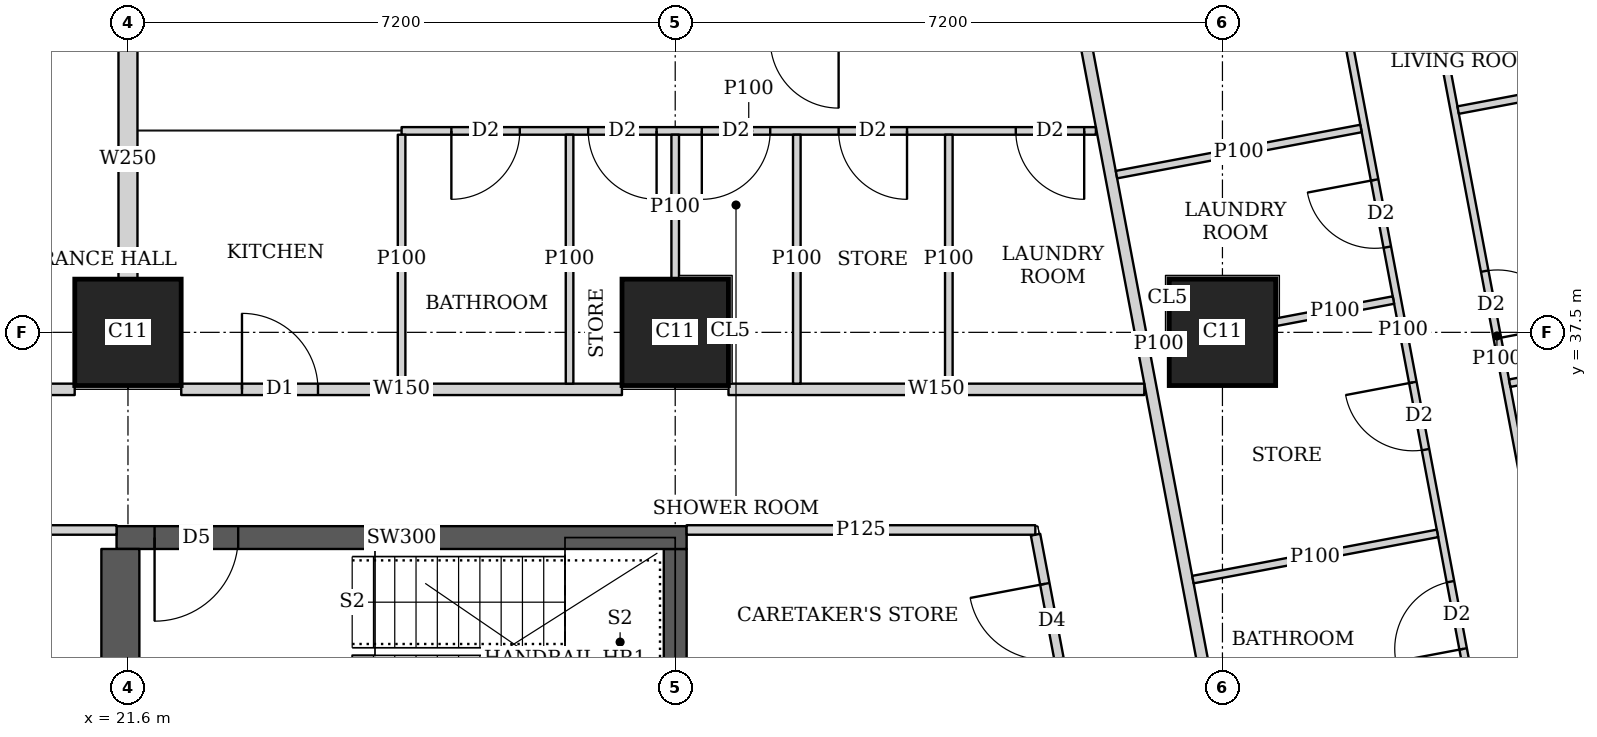
"""IFC4 building model, lengths in metres.
Left out: names, types, materials, properties, quantities, classifications, styles, units other than length and angle.
Written with IfcOpenShell. Run it as: python <this file> out.ifc"""

import sys

from ifc_helpers import new_model, si_unit, direction, frame, frame_2d, origin, origin_2d, place, context, subcontext, project, spatial, rectangle, extrude, element, fill, save


model = new_model("IFC4")
c1 = context("Model", 3, precision=1e-05, world=origin(), true_north=direction((0.0, 1.0)))
c2 = subcontext(c1, "Body", "Model", "MODEL_VIEW")
j1 = project(units=[si_unit("LENGTHUNIT", "METRE"), si_unit("PLANEANGLEUNIT", "RADIAN")], contexts=[c1])
p1 = place(None, origin())
s1 = spatial("IfcSite", under=j1, at=p1, CompositionType="ELEMENT")
p2 = place(p1, origin())
s2 = spatial("IfcBuilding", under=s1, at=p2, CompositionType="ELEMENT")
p3 = place(p2, frame((0.0, 0.0, 234.95)))
s3 = spatial("IfcBuildingStorey", under=s2, at=p3, CompositionType="ELEMENT", Elevation=234.95)
for number, where, z_axis, x_axis in (
    (1, (21.6, 37.5, 0.0), (0.0, 0.0, 1.0), (1.0, 0.0, 0.0)),
    (2, (28.8, 37.5, 0.0), (0.0, 0.0, 1.0), (1.0, 0.0, 0.0)),
    (3, (36.0, 37.5, 0.0), (0.0, 0.0, 1.0), (1.0, 0.0, 0.0)),
):
    element("IfcColumn", number, at=place(p3, frame(where, z_axis=z_axis, x_axis=x_axis)), inside=s3, PredefinedType="COLUMN", context=c2, shape_type="SweptSolid", body=[
        extrude(rectangle(XDim=1.4, YDim=1.4, at=origin_2d()), origin(), (0.0, 0.0, 1.0), 3.75),
    ])
p4 = place(p3, frame((21.45, 34.8, 0.0), z_axis=(0.0, 0.0, 1.0), x_axis=(1.0, 0.0, 0.0)))
e4 = element("IfcWall", 4, at=p4, inside=s3, PredefinedType="SHEAR", context=c2, shape_type="SweptSolid", body=[
    extrude(rectangle(XDim=7.5, YDim=0.3, at=frame_2d((3.75, 0.0))), origin(), (0.0, 0.0, 1.0), 3.75),
])
p5 = place(p4, frame((0.5, 0.0, 0.0)))
e5 = element("IfcOpeningElement", 5, at=p5, cuts=e4, PredefinedType="OPENING", context=c2, shape_type="SweptSolid", body=[
    extrude(rectangle(XDim=1.1, YDim=2.1, at=frame_2d((0.55, 1.05))), frame((0.0, 0.16, 0.0), z_axis=(0.0, -1.0, 0.0), x_axis=(1.0, 0.0, 0.0)), (0.0, 0.0, 1.0), 0.32),
])
p6 = place(p3, frame((21.5, 30.45, 0.0), z_axis=(0.0, 0.0, 1.0), x_axis=(0.0, 1.0, 0.0)))
e6 = element("IfcWall", 6, at=p6, inside=s3, PredefinedType="SHEAR", context=c2, shape_type="SweptSolid", body=[
    extrude(rectangle(XDim=4.2, YDim=0.5, at=frame_2d((2.1, 0.0))), origin(), (0.0, 0.0, 1.0), 3.75),
])
p7 = place(p3, frame((28.8, 30.45, 0.0), z_axis=(0.0, 0.0, 1.0), x_axis=(0.0, 1.0, 0.0)))
e7 = element("IfcWall", 7, at=p7, inside=s3, PredefinedType="SHEAR", context=c2, shape_type="SweptSolid", body=[
    extrude(rectangle(XDim=4.2, YDim=0.3, at=frame_2d((2.1, 0.0))), origin(), (0.0, 0.0, 1.0), 3.75),
])
p8 = place(p3, frame((16.201, 36.75, 0.0), z_axis=(0.0, 0.0, 1.0), x_axis=(1.0, 0.0, 0.0)))
e8 = element("IfcWall", 8, at=p8, inside=s3, PredefinedType="SOLIDWALL", context=c2, shape_type="SweptSolid", body=[
    extrude(rectangle(XDim=4.698, YDim=0.15, at=frame_2d((2.349, 0.0))), origin(), (0.0, 0.0, 1.0), 3.5),
])
p9 = place(p8, frame((0.353, 0.0, 0.0)))
e9 = element("IfcOpeningElement", 9, at=p9, cuts=e8, PredefinedType="OPENING", context=c2, shape_type="SweptSolid", body=[
    extrude(rectangle(XDim=1.0, YDim=2.1, at=frame_2d((0.5, 1.05))), frame((0.0, 0.085, 0.0), z_axis=(0.0, -1.0, 0.0), x_axis=(1.0, 0.0, 0.0)), (0.0, 0.0, 1.0), 0.17),
])
p10 = place(p3, frame((22.301, 36.75, 0.0), z_axis=(0.0, 0.0, 1.0), x_axis=(1.0, 0.0, 0.0)))
e10 = element("IfcWall", 10, at=p10, inside=s3, PredefinedType="SOLIDWALL", context=c2, shape_type="SweptSolid", body=[
    extrude(rectangle(XDim=5.798, YDim=0.15, at=frame_2d((2.899, 0.0))), origin(), (0.0, 0.0, 1.0), 3.5),
])
p11 = place(p10, frame((0.799, 0.0, 0.0)))
e11 = element("IfcOpeningElement", 11, at=p11, cuts=e10, PredefinedType="OPENING", context=c2, shape_type="SweptSolid", body=[
    extrude(rectangle(XDim=1.0, YDim=2.1, at=frame_2d((0.5, 1.05))), frame((0.0, 0.085, 0.0), z_axis=(0.0, -1.0, 0.0), x_axis=(1.0, 0.0, 0.0)), (0.0, 0.0, 1.0), 0.17),
])
p12 = place(p3, frame((29.501, 36.75, 0.0), z_axis=(0.0, 0.0, 1.0), x_axis=(1.0, 0.0, 0.0)))
e12 = element("IfcWall", 12, at=p12, inside=s3, PredefinedType="SOLIDWALL", context=c2, shape_type="SweptSolid", body=[
    extrude(rectangle(XDim=5.471, YDim=0.15, at=frame_2d((2.735, 0.0))), origin(), (0.0, 0.0, 1.0), 3.5),
])
p13 = place(p3, frame((33.933, 42.73, 0.0), z_axis=(0.0, 0.0, 1.0), x_axis=(0.185595417643, -0.982626246825, 0.0)))
e13 = element("IfcWall", 13, at=p13, inside=s3, PredefinedType="SOLIDWALL", context=c2, shape_type="SweptSolid", body=[
    extrude(rectangle(XDim=41.051, YDim=0.15, at=frame_2d((20.525, 0.0))), origin(), (0.0, 0.0, 1.0), 2.5),
])
p14 = place(p13, frame((12.266, 0.0, 0.0)))
e14 = element("IfcOpeningElement", 14, at=p14, cuts=e13, PredefinedType="OPENING", context=c2, shape_type="SweptSolid", body=[
    extrude(rectangle(XDim=1.0, YDim=2.1, at=frame_2d((0.5, 1.05))), frame((0.0, 0.085, 0.0), z_axis=(0.0, -1.0, 0.0), x_axis=(1.0, 0.0, 0.0)), (0.0, 0.0, 1.0), 0.17),
])
p15 = place(p13, frame((16.082, 0.0, 0.0)))
e15 = element("IfcOpeningElement", 15, at=p15, cuts=e13, PredefinedType="OPENING", context=c2, shape_type="SweptSolid", body=[
    extrude(rectangle(XDim=1.0, YDim=2.1, at=frame_2d((0.5, 1.05))), frame((0.0, 0.085, 0.0), z_axis=(0.0, -1.0, 0.0), x_axis=(1.0, 0.0, 0.0)), (0.0, 0.0, 1.0), 0.17),
])
p16 = place(p13, frame((30.862, 0.0, 0.0)))
e16 = element("IfcOpeningElement", 16, at=p16, cuts=e13, PredefinedType="OPENING", context=c2, shape_type="SweptSolid", body=[
    extrude(rectangle(XDim=1.0, YDim=2.1, at=frame_2d((0.5, 1.05))), frame((0.0, 0.085, 0.0), z_axis=(0.0, -1.0, 0.0), x_axis=(1.0, 0.0, 0.0)), (0.0, 0.0, 1.0), 0.17),
])
p17 = place(p3, frame((38.764, 41.941, 0.0), z_axis=(0.0, 0.0, 1.0), x_axis=(0.185548572312, -0.982635093671, 0.0)))
e17 = element("IfcWall", 17, at=p17, inside=s3, PredefinedType="PARTITIONING", context=c2, shape_type="SweptSolid", body=[
    extrude(rectangle(XDim=9.135, YDim=0.1, at=frame_2d((4.568, 0.0))), origin(), (0.0, 0.0, 1.0), 3.5),
])
p18 = place(p17, frame((8.085, 0.0, 0.0)))
e18 = element("IfcOpeningElement", 18, at=p18, cuts=e17, PredefinedType="OPENING", context=c2, shape_type="SweptSolid", body=[
    extrude(rectangle(XDim=0.9, YDim=2.1, at=frame_2d((0.45, 1.05))), frame((0.0, 0.06, 0.0), z_axis=(0.0, -1.0, 0.0), x_axis=(1.0, 0.0, 0.0)), (0.0, 0.0, 1.0), 0.12),
])
p19 = place(p17, frame((3.7, 0.0, 0.0)))
e19 = element("IfcOpeningElement", 19, at=p19, cuts=e17, PredefinedType="OPENING", context=c2, shape_type="SweptSolid", body=[
    extrude(rectangle(XDim=0.9, YDim=2.1, at=frame_2d((0.45, 1.05))), frame((0.0, 0.06, 0.0), z_axis=(0.0, -1.0, 0.0), x_axis=(1.0, 0.0, 0.0)), (0.0, 0.0, 1.0), 0.12),
])
p20 = place(p3, frame((37.473, 42.309, 0.0), z_axis=(0.0, 0.0, 1.0), x_axis=(0.185491912953, -0.982645790827, 0.0)))
e20 = element("IfcWall", 20, at=p20, inside=s3, PredefinedType="PARTITIONING", context=c2, shape_type="SweptSolid", body=[
    extrude(rectangle(XDim=9.737, YDim=0.1, at=frame_2d((4.869, 0.0))), origin(), (0.0, 0.0, 1.0), 3.5),
])
p21 = place(p20, frame((8.232, 0.0, 0.0)))
e21 = element("IfcOpeningElement", 21, at=p21, cuts=e20, PredefinedType="OPENING", context=c2, shape_type="SweptSolid", body=[
    extrude(rectangle(XDim=0.9, YDim=2.1, at=frame_2d((0.45, 1.05))), frame((0.0, 0.06, 0.0), z_axis=(0.0, -1.0, 0.0), x_axis=(1.0, 0.0, 0.0)), (0.0, 0.0, 1.0), 0.12),
])
p22 = place(p20, frame((2.853, 0.0, 0.0)))
e22 = element("IfcOpeningElement", 22, at=p22, cuts=e20, PredefinedType="OPENING", context=c2, shape_type="SweptSolid", body=[
    extrude(rectangle(XDim=0.9, YDim=2.1, at=frame_2d((0.45, 1.05))), frame((0.0, 0.06, 0.0), z_axis=(0.0, -1.0, 0.0), x_axis=(1.0, 0.0, 0.0)), (0.0, 0.0, 1.0), 0.12),
])
p23 = place(p20, frame((5.564, 0.0, 0.0)))
e23 = element("IfcOpeningElement", 23, at=p23, cuts=e20, PredefinedType="OPENING", context=c2, shape_type="SweptSolid", body=[
    extrude(rectangle(XDim=0.9, YDim=2.1, at=frame_2d((0.45, 1.05))), frame((0.0, 0.06, 0.0), z_axis=(0.0, -1.0, 0.0), x_axis=(1.0, 0.0, 0.0)), (0.0, 0.0, 1.0), 0.12),
])
p24 = place(p3, frame((43.277, 41.212, 0.0), z_axis=(0.0, 0.0, 1.0), x_axis=(-0.982665405803, -0.185387972203, 0.0)))
e24 = element("IfcWall", 24, at=p24, inside=s3, PredefinedType="PARTITIONING", context=c2, shape_type="SweptSolid", body=[
    extrude(rectangle(XDim=4.25, YDim=0.1, at=frame_2d((2.125, 0.0))), origin(), (0.0, 0.0, 1.0), 2.05),
])
p25 = place(p3, frame((40.854, 37.034, 0.0), z_axis=(0.0, 0.0, 1.0), x_axis=(-0.982651678759, -0.185460718839, 0.0)))
e25 = element("IfcWall", 25, at=p25, inside=s3, PredefinedType="PARTITIONING", context=c2, shape_type="SweptSolid", body=[
    extrude(rectangle(XDim=1.094, YDim=0.1, at=frame_2d((0.547, 0.0))), origin(), (0.0, 0.0, 1.0), 3.5),
])
p26 = place(p3, frame((37.823, 40.182, 0.0), z_axis=(0.0, 0.0, 1.0), x_axis=(-0.982664729897, -0.18539155487, 0.0)))
e26 = element("IfcWall", 26, at=p26, inside=s3, PredefinedType="PARTITIONING", context=c2, shape_type="SweptSolid", body=[
    extrude(rectangle(XDim=3.274, YDim=0.1, at=frame_2d((1.637, 0.0))), origin(), (0.0, 0.0, 1.0), 3.5),
])
p27 = place(p3, frame((38.25, 37.925, 0.0), z_axis=(0.0, 0.0, 1.0), x_axis=(-0.982610209589, -0.185680305934, 0.0)))
e27 = element("IfcWall", 27, at=p27, inside=s3, PredefinedType="PARTITIONING", context=c2, shape_type="SweptSolid", body=[
    extrude(rectangle(XDim=1.567, YDim=0.1, at=frame_2d((0.784, 0.0))), origin(), (0.0, 0.0, 1.0), 3.5),
])
p28 = place(p3, frame((35.29, 37.366, 0.0), z_axis=(0.0, 0.0, 1.0), x_axis=(-0.982395465615, -0.18681313963, 0.0)))
e28 = element("IfcWall", 28, at=p28, inside=s3, PredefinedType="PARTITIONING", context=c2, shape_type="SweptSolid", body=[
    extrude(rectangle(XDim=0.263, YDim=0.1, at=frame_2d((0.131, 0.0))), origin(), (0.0, 0.0, 1.0), 3.5),
])
p29 = place(p3, frame((38.829, 34.855, 0.0), z_axis=(0.0, 0.0, 1.0), x_axis=(-0.982610347627, -0.185679575441, 0.0)))
e29 = element("IfcWall", 29, at=p29, inside=s3, PredefinedType="PARTITIONING", context=c2, shape_type="SweptSolid", body=[
    extrude(rectangle(XDim=3.274, YDim=0.1, at=frame_2d((1.637, 0.0))), origin(), (0.0, 0.0, 1.0), 3.5),
])
p30 = place(p3, frame((25.2, 40.15, 0.0), z_axis=(0.0, 0.0, 1.0), x_axis=(1.0, 0.0, 0.0)))
e30 = element("IfcWall", 30, at=p30, inside=s3, PredefinedType="PARTITIONING", context=c2, shape_type="SweptSolid", body=[
    extrude(rectangle(XDim=9.135, YDim=0.1, at=frame_2d((4.567, 0.0))), origin(), (0.0, 0.0, 1.0), 3.5),
])
p31 = place(p30, frame((0.655, 0.0, 0.0)))
e31 = element("IfcOpeningElement", 31, at=p31, cuts=e30, PredefinedType="OPENING", context=c2, shape_type="SweptSolid", body=[
    extrude(rectangle(XDim=0.9, YDim=2.1, at=frame_2d((0.45, 1.05))), frame((0.0, 0.06, 0.0), z_axis=(0.0, -1.0, 0.0), x_axis=(1.0, 0.0, 0.0)), (0.0, 0.0, 1.0), 0.12),
])
p32 = place(p30, frame((3.95, 0.0, 0.0)))
e32 = element("IfcOpeningElement", 32, at=p32, cuts=e30, PredefinedType="OPENING", context=c2, shape_type="SweptSolid", body=[
    extrude(rectangle(XDim=0.9, YDim=2.1, at=frame_2d((0.45, 1.05))), frame((0.0, 0.06, 0.0), z_axis=(0.0, -1.0, 0.0), x_axis=(1.0, 0.0, 0.0)), (0.0, 0.0, 1.0), 0.12),
])
p33 = place(p30, frame((8.081, 0.0, 0.0)))
e33 = element("IfcOpeningElement", 33, at=p33, cuts=e30, PredefinedType="OPENING", context=c2, shape_type="SweptSolid", body=[
    extrude(rectangle(XDim=0.9, YDim=2.1, at=frame_2d((0.45, 1.05))), frame((0.0, 0.06, 0.0), z_axis=(0.0, -1.0, 0.0), x_axis=(1.0, 0.0, 0.0)), (0.0, 0.0, 1.0), 0.12),
])
p34 = place(p30, frame((2.455, 0.0, 0.0)))
e34 = element("IfcOpeningElement", 34, at=p34, cuts=e30, PredefinedType="OPENING", context=c2, shape_type="SweptSolid", body=[
    extrude(rectangle(XDim=0.9, YDim=2.1, at=frame_2d((0.45, 1.05))), frame((0.0, 0.06, 0.0), z_axis=(0.0, -1.0, 0.0), x_axis=(1.0, 0.0, 0.0)), (0.0, 0.0, 1.0), 0.12),
])
p35 = place(p30, frame((5.75, 0.0, 0.0)))
e35 = element("IfcOpeningElement", 35, at=p35, cuts=e30, PredefinedType="OPENING", context=c2, shape_type="SweptSolid", body=[
    extrude(rectangle(XDim=0.9, YDim=2.1, at=frame_2d((0.45, 1.05))), frame((0.0, 0.06, 0.0), z_axis=(0.0, -1.0, 0.0), x_axis=(1.0, 0.0, 0.0)), (0.0, 0.0, 1.0), 0.12),
])
p36 = place(p3, frame((25.2, 36.825, 0.0), z_axis=(0.0, 0.0, 1.0), x_axis=(0.0, 1.0, 0.0)))
e36 = element("IfcWall", 36, at=p36, inside=s3, PredefinedType="PARTITIONING", context=c2, shape_type="SweptSolid", body=[
    extrude(rectangle(XDim=3.275, YDim=0.1, at=frame_2d((1.638, 0.0))), origin(), (0.0, 0.0, 1.0), 3.5),
])
p37 = place(p3, frame((28.8, 38.201, 0.0), z_axis=(0.0, 0.0, 1.0), x_axis=(0.0, 1.0, 0.0)))
e37 = element("IfcWall", 37, at=p37, inside=s3, PredefinedType="PARTITIONING", context=c2, shape_type="SweptSolid", body=[
    extrude(rectangle(XDim=1.899, YDim=0.1, at=frame_2d((0.95, 0.0))), origin(), (0.0, 0.0, 1.0), 3.5),
])
for number, where, z_axis, x_axis in (
    (38, (32.4, 36.825, 0.0), (0.0, 0.0, 1.0), (0.0, 1.0, 0.0)),
    (39, (27.41, 36.825, 0.0), (0.0, 0.0, 1.0), (0.0, 1.0, 0.0)),
    (40, (30.4, 36.825, 0.0), (0.0, 0.0, 1.0), (0.0, 1.0, 0.0)),
):
    element("IfcWall", number, at=place(p3, frame(where, z_axis=z_axis, x_axis=x_axis)), inside=s3, PredefinedType="PARTITIONING", context=c2, shape_type="SweptSolid", body=[
        extrude(rectangle(XDim=3.275, YDim=0.1, at=frame_2d((1.638, 0.0))), origin(), (0.0, 0.0, 1.0), 3.5),
    ])
p38 = place(p3, frame((21.6, 38.201, 0.0), z_axis=(0.0, 0.0, 1.0), x_axis=(0.0, 1.0, 0.0)))
e41 = element("IfcWall", 41, at=p38, inside=s3, PredefinedType="SOLIDWALL", context=c2, shape_type="SweptSolid", body=[
    extrude(rectangle(XDim=3.149, YDim=0.25, at=frame_2d((1.575, 0.0))), origin(), (0.0, 0.0, 1.0), 3.5),
])
p39 = place(p3, frame((13.75, 34.9, 0.0), z_axis=(0.0, 0.0, 1.0), x_axis=(1.0, 0.0, 0.0)))
e42 = element("IfcWall", 42, at=p39, inside=s3, PredefinedType="PARTITIONING", context=c2, shape_type="SweptSolid", body=[
    extrude(rectangle(XDim=7.7, YDim=0.125, at=frame_2d((3.85, 0.0))), origin(), (0.0, 0.0, 1.0), 3.5),
])
p40 = place(p39, frame((4.15, 0.0, 0.0)))
e43 = element("IfcOpeningElement", 43, at=p40, cuts=e42, PredefinedType="OPENING", context=c2, shape_type="SweptSolid", body=[
    extrude(rectangle(XDim=1.8, YDim=2.1, at=frame_2d((0.9, 1.05))), frame((0.0, 0.073, 0.0), z_axis=(0.0, -1.0, 0.0), x_axis=(1.0, 0.0, 0.0)), (0.0, 0.0, 1.0), 0.145),
])
p41 = place(p3, frame((28.95, 34.9, 0.0), z_axis=(0.0, 0.0, 1.0), x_axis=(1.0, 0.0, 0.0)))
e44 = element("IfcWall", 44, at=p41, inside=s3, PredefinedType="PARTITIONING", context=c2, shape_type="SweptSolid", body=[
    extrude(rectangle(XDim=4.588, YDim=0.125, at=frame_2d((2.294, 0.0))), origin(), (0.0, 0.0, 1.0), 3.5),
])
p42 = place(p3, frame((38.202, 10.163, 0.0), z_axis=(0.0, 0.0, 1.0), x_axis=(-0.185610321132, 0.982623431783, 0.0)))
e45 = element("IfcWall", 45, at=p42, inside=s3, PredefinedType="PARTITIONING", context=c2, shape_type="SweptSolid", body=[
    extrude(rectangle(XDim=25.111, YDim=0.125, at=frame_2d((12.556, 0.0))), origin(), (0.0, 0.0, 1.0), 2.5),
])
p43 = place(p42, frame((0.708, 0.0, 0.0)))
e46 = element("IfcOpeningElement", 46, at=p43, cuts=e45, PredefinedType="OPENING", context=c2, shape_type="SweptSolid", body=[
    extrude(rectangle(XDim=1.0, YDim=2.1, at=frame_2d((0.5, 1.05))), frame((0.0, 0.073, 0.0), z_axis=(0.0, -1.0, 0.0), x_axis=(1.0, 0.0, 0.0)), (0.0, 0.0, 1.0), 0.145),
])
p44 = place(p42, frame((13.378, 0.0, 0.0)))
e47 = element("IfcOpeningElement", 47, at=p44, cuts=e45, PredefinedType="OPENING", context=c2, shape_type="SweptSolid", body=[
    extrude(rectangle(XDim=1.0, YDim=2.1, at=frame_2d((0.5, 1.05))), frame((0.0, 0.073, 0.0), z_axis=(0.0, -1.0, 0.0), x_axis=(1.0, 0.0, 0.0)), (0.0, 0.0, 1.0), 0.145),
])
p45 = place(p42, frame((21.15, 0.0, 0.0)))
e48 = element("IfcOpeningElement", 48, at=p45, cuts=e45, PredefinedType="OPENING", context=c2, shape_type="SweptSolid", body=[
    extrude(rectangle(XDim=1.0, YDim=2.1, at=frame_2d((0.5, 1.05))), frame((0.0, 0.073, 0.0), z_axis=(0.0, -1.0, 0.0), x_axis=(1.0, 0.0, 0.0)), (0.0, 0.0, 1.0), 0.145),
])
p46 = place(p42, frame((23.453, 0.0, 0.0)))
e49 = element("IfcOpeningElement", 49, at=p46, cuts=e45, PredefinedType="OPENING", context=c2, shape_type="SweptSolid", body=[
    extrude(rectangle(XDim=1.0, YDim=2.1, at=frame_2d((0.5, 1.05))), frame((0.0, 0.073, 0.0), z_axis=(0.0, -1.0, 0.0), x_axis=(1.0, 0.0, 0.0)), (0.0, 0.0, 1.0), 0.145),
])
p47 = place(p19, origin())
e50 = element("IfcDoor", 50, at=p47, inside=s3, OperationType="SINGLE_SWING_RIGHT", PredefinedType="DOOR", context=c2, shape_type="SweptSolid", body=[
    extrude(rectangle(XDim=0.9, YDim=2.1, at=frame_2d((0.45, 1.05))), frame((0.0, 0.025, 0.0), z_axis=(0.0, -1.0, 0.0), x_axis=(1.0, 0.0, 0.0)), (0.0, 0.0, 1.0), 0.05),
])
fill(e19, e50)
p48 = place(p21, origin())
e51 = element("IfcDoor", 51, at=p48, inside=s3, OperationType="SINGLE_SWING_LEFT", PredefinedType="DOOR", context=c2, shape_type="SweptSolid", body=[
    extrude(rectangle(XDim=0.9, YDim=2.1, at=frame_2d((0.45, 1.05))), frame((0.0, 0.025, 0.0), z_axis=(0.0, -1.0, 0.0), x_axis=(1.0, 0.0, 0.0)), (0.0, 0.0, 1.0), 0.05),
])
fill(e21, e51)
p49 = place(p22, origin())
e52 = element("IfcDoor", 52, at=p49, inside=s3, OperationType="SINGLE_SWING_RIGHT", PredefinedType="DOOR", context=c2, shape_type="SweptSolid", body=[
    extrude(rectangle(XDim=0.9, YDim=2.1, at=frame_2d((0.45, 1.05))), frame((0.0, 0.025, 0.0), z_axis=(0.0, -1.0, 0.0), x_axis=(1.0, 0.0, 0.0)), (0.0, 0.0, 1.0), 0.05),
])
fill(e22, e52)
p50 = place(p23, origin())
e53 = element("IfcDoor", 53, at=p50, inside=s3, OperationType="SINGLE_SWING_RIGHT", PredefinedType="DOOR", context=c2, shape_type="SweptSolid", body=[
    extrude(rectangle(XDim=0.9, YDim=2.1, at=frame_2d((0.45, 1.05))), frame((0.0, 0.025, 0.0), z_axis=(0.0, -1.0, 0.0), x_axis=(1.0, 0.0, 0.0)), (0.0, 0.0, 1.0), 0.05),
])
fill(e23, e53)
p51 = place(p31, origin())
e54 = element("IfcDoor", 54, at=p51, inside=s3, OperationType="SINGLE_SWING_RIGHT", PredefinedType="DOOR", context=c2, shape_type="SweptSolid", body=[
    extrude(rectangle(XDim=0.9, YDim=2.1, at=frame_2d((0.45, 1.05))), frame((0.0, 0.025, 0.0), z_axis=(0.0, -1.0, 0.0), x_axis=(1.0, 0.0, 0.0)), (0.0, 0.0, 1.0), 0.05),
])
fill(e31, e54)
p52 = place(p32, origin())
e55 = element("IfcDoor", 55, at=p52, inside=s3, OperationType="SINGLE_SWING_RIGHT", PredefinedType="DOOR", context=c2, shape_type="SweptSolid", body=[
    extrude(rectangle(XDim=0.9, YDim=2.1, at=frame_2d((0.45, 1.05))), frame((0.0, 0.025, 0.0), z_axis=(0.0, -1.0, 0.0), x_axis=(1.0, 0.0, 0.0)), (0.0, 0.0, 1.0), 0.05),
])
fill(e32, e55)
p53 = place(p33, origin())
e56 = element("IfcDoor", 56, at=p53, inside=s3, OperationType="SINGLE_SWING_LEFT", PredefinedType="DOOR", context=c2, shape_type="SweptSolid", body=[
    extrude(rectangle(XDim=0.9, YDim=2.1, at=frame_2d((0.45, 1.05))), frame((0.0, 0.025, 0.0), z_axis=(0.0, -1.0, 0.0), x_axis=(1.0, 0.0, 0.0)), (0.0, 0.0, 1.0), 0.05),
])
fill(e33, e56)
p54 = place(p34, origin())
e57 = element("IfcDoor", 57, at=p54, inside=s3, OperationType="SINGLE_SWING_LEFT", PredefinedType="DOOR", context=c2, shape_type="SweptSolid", body=[
    extrude(rectangle(XDim=0.9, YDim=2.1, at=frame_2d((0.45, 1.05))), frame((0.0, 0.025, 0.0), z_axis=(0.0, -1.0, 0.0), x_axis=(1.0, 0.0, 0.0)), (0.0, 0.0, 1.0), 0.05),
])
fill(e34, e57)
p55 = place(p35, origin())
e58 = element("IfcDoor", 58, at=p55, inside=s3, OperationType="SINGLE_SWING_LEFT", PredefinedType="DOOR", context=c2, shape_type="SweptSolid", body=[
    extrude(rectangle(XDim=0.9, YDim=2.1, at=frame_2d((0.45, 1.05))), frame((0.0, 0.025, 0.0), z_axis=(0.0, -1.0, 0.0), x_axis=(1.0, 0.0, 0.0)), (0.0, 0.0, 1.0), 0.05),
])
fill(e35, e58)
p56 = place(p11, origin())
e59 = element("IfcDoor", 59, at=p56, inside=s3, OperationType="SINGLE_SWING_LEFT", PredefinedType="DOOR", context=c2, shape_type="SweptSolid", body=[
    extrude(rectangle(XDim=1.0, YDim=2.1, at=frame_2d((0.5, 1.05))), frame((0.0, 0.025, 0.0), z_axis=(0.0, -1.0, 0.0), x_axis=(1.0, 0.0, 0.0)), (0.0, 0.0, 1.0), 0.05),
])
fill(e11, e59)
p57 = place(p46, origin())
e60 = element("IfcDoor", 60, at=p57, inside=s3, OperationType="SINGLE_SWING_RIGHT", PredefinedType="DOOR", context=c2, shape_type="SweptSolid", body=[
    extrude(rectangle(XDim=1.0, YDim=2.1, at=frame_2d((0.5, 1.05))), frame((0.0, 0.025, 0.0), z_axis=(0.0, -1.0, 0.0), x_axis=(1.0, 0.0, 0.0)), (0.0, 0.0, 1.0), 0.05),
])
fill(e49, e60)
p58 = place(p5, origin())
e61 = element("IfcDoor", 61, at=p58, inside=s3, OperationType="SINGLE_SWING_RIGHT", PredefinedType="DOOR", context=c2, shape_type="SweptSolid", body=[
    extrude(rectangle(XDim=1.1, YDim=2.1, at=frame_2d((0.55, 1.05))), frame((0.0, 0.025, 0.0), z_axis=(0.0, -1.0, 0.0), x_axis=(1.0, 0.0, 0.0)), (0.0, 0.0, 1.0), 0.05),
])
fill(e5, e61)
save(model, sys.argv[1])
